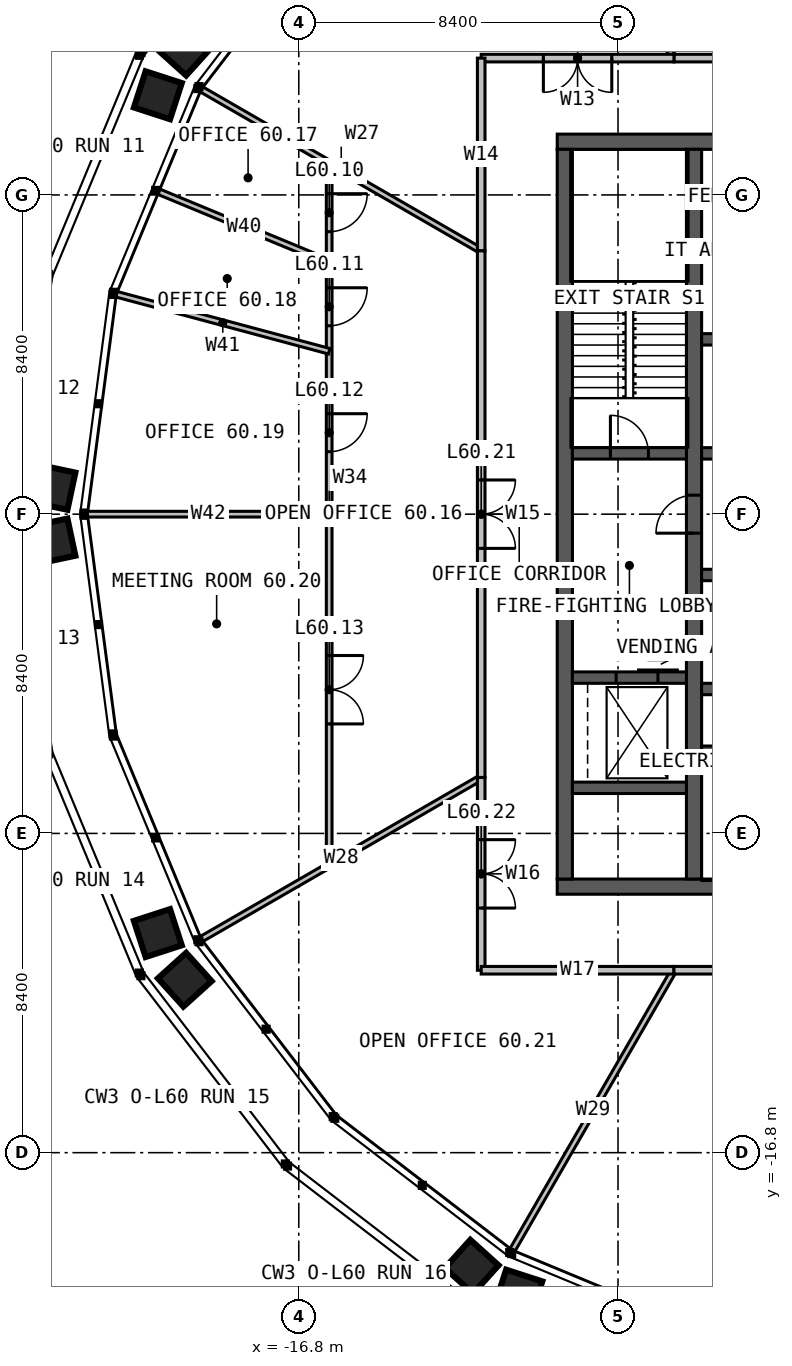
"""IFC4 building model, lengths in metres.
Left out: names, types, materials, properties, quantities, classifications, styles, units other than length and angle.
Written with IfcOpenShell. Run it as: python <this file> out.ifc"""

import sys

from ifc_helpers import new_model, si_unit, direction, frame, frame_2d, origin, place, context, subcontext, project, spatial, rectangle, extrude, element, fill, save


model = new_model("IFC4")
c1 = context("Model", 3, precision=1e-05, world=origin(), true_north=direction((0.0, 1.0)))
c2 = subcontext(c1, "Body", "Model", "MODEL_VIEW")
j1 = project(units=[si_unit("LENGTHUNIT", "METRE"), si_unit("PLANEANGLEUNIT", "RADIAN")], contexts=[c1])
p1 = place(None, origin())
s1 = spatial("IfcSite", under=j1, at=p1, CompositionType="ELEMENT")
p2 = place(p1, origin())
s2 = spatial("IfcBuilding", under=s1, at=p2, CompositionType="ELEMENT")
p3 = place(p2, frame((0.0, 0.0, 248.0)))
s3 = spatial("IfcBuildingStorey", under=s2, at=p3, CompositionType="ELEMENT", Elevation=248.0)
p4 = place(p3, frame((-10.0, 9.8, 0.0), z_axis=(0.0, 0.0, 1.0), x_axis=(1.0, 0.0, 0.0)))
e1 = element("IfcWall", 1, at=p4, inside=s3, PredefinedType="SOLIDWALL", context=c2, shape_type="SweptSolid", body=[
    extrude(rectangle(XDim=20.0, YDim=0.4, at=frame_2d((10.0, 0.0))), origin(), (0.0, 0.0, 1.0), 4.0),
])
p5 = place(p4, frame((9.4, 0.0, 0.0)))
e2 = element("IfcOpeningElement", 2, at=p5, cuts=e1, PredefinedType="OPENING", context=c2, shape_type="SweptSolid", body=[
    extrude(rectangle(XDim=1.2, YDim=2.2, at=frame_2d((0.6, 1.1))), frame((0.0, 0.21, 0.0), z_axis=(0.0, -1.0, 0.0), x_axis=(1.0, 0.0, 0.0)), (0.0, 0.0, 1.0), 0.42),
])
p6 = place(p3, frame((10.0, -9.8, 0.0), z_axis=(0.0, 0.0, 1.0), x_axis=(-1.0, 0.0, 0.0)))
e3 = element("IfcWall", 3, at=p6, inside=s3, PredefinedType="SOLIDWALL", context=c2, shape_type="SweptSolid", body=[
    extrude(rectangle(XDim=20.0, YDim=0.4, at=frame_2d((10.0, 0.0))), origin(), (0.0, 0.0, 1.0), 4.0),
])
p7 = place(p6, frame((6.875, 0.0, 0.0)))
e4 = element("IfcOpeningElement", 4, at=p7, cuts=e3, PredefinedType="OPENING", context=c2, shape_type="SweptSolid", body=[
    extrude(rectangle(XDim=1.2, YDim=2.2, at=frame_2d((0.6, 1.1))), frame((0.0, 0.21, 0.0), z_axis=(0.0, -1.0, 0.0), x_axis=(1.0, 0.0, 0.0)), (0.0, 0.0, 1.0), 0.42),
])
p8 = place(p3, frame((-9.8, 9.6, 0.0), z_axis=(0.0, 0.0, 1.0), x_axis=(0.0, -1.0, 0.0)))
e5 = element("IfcWall", 5, at=p8, inside=s3, PredefinedType="SOLIDWALL", context=c2, shape_type="SweptSolid", body=[
    extrude(rectangle(XDim=19.2, YDim=0.4, at=frame_2d((9.6, 0.0))), origin(), (0.0, 0.0, 1.0), 4.0),
])
p9 = place(p3, frame((-6.4, -9.6, 0.0), z_axis=(0.0, 0.0, 1.0), x_axis=(0.0, 1.0, 0.0)))
e6 = element("IfcWall", 6, at=p9, inside=s3, PredefinedType="SOLIDWALL", context=c2, shape_type="SweptSolid", body=[
    extrude(rectangle(XDim=19.2, YDim=0.4, at=frame_2d((9.6, 0.0))), origin(), (0.0, 0.0, 1.0), 4.0),
])
p10 = place(p9, frame((9.1, 0.0, 0.0)))
e7 = element("IfcOpeningElement", 7, at=p10, cuts=e6, PredefinedType="OPENING", context=c2, shape_type="SweptSolid", body=[
    extrude(rectangle(XDim=1.0, YDim=2.2, at=frame_2d((0.5, 1.1))), frame((0.0, 0.21, 0.0), z_axis=(0.0, -1.0, 0.0), x_axis=(1.0, 0.0, 0.0)), (0.0, 0.0, 1.0), 0.42),
])
p11 = place(p3, frame((-6.2, 1.6, 0.0), z_axis=(0.0, 0.0, 1.0), x_axis=(1.0, 0.0, 0.0)))
e8 = element("IfcWall", 8, at=p11, inside=s3, PredefinedType="SOLIDWALL", context=c2, shape_type="SweptSolid", body=[
    extrude(rectangle(XDim=4.85, YDim=0.3, at=frame_2d((2.425, 0.0))), origin(), (0.0, 0.0, 1.0), 4.0),
])
p12 = place(p11, frame((0.625, 0.0, 0.0)))
e9 = element("IfcOpeningElement", 9, at=p12, cuts=e8, PredefinedType="OPENING", context=c2, shape_type="SweptSolid", body=[
    extrude(rectangle(XDim=1.1, YDim=2.2, at=frame_2d((0.55, 1.1))), frame((0.0, 0.16, 0.0), z_axis=(0.0, -1.0, 0.0), x_axis=(1.0, 0.0, 0.0)), (0.0, 0.0, 1.0), 0.32),
])
p13 = place(p11, frame((3.15, 0.0, 0.0)))
e10 = element("IfcOpeningElement", 10, at=p13, cuts=e8, PredefinedType="OPENING", context=c2, shape_type="SweptSolid", body=[
    extrude(rectangle(XDim=1.1, YDim=2.2, at=frame_2d((0.55, 1.1))), frame((0.0, 0.16, 0.0), z_axis=(0.0, -1.0, 0.0), x_axis=(1.0, 0.0, 0.0)), (0.0, 0.0, 1.0), 0.32),
])
p14 = place(p3, frame((-6.2, 4.6, 0.0), z_axis=(0.0, 0.0, 1.0), x_axis=(1.0, 0.0, 0.0)))
e11 = element("IfcWall", 11, at=p14, inside=s3, PredefinedType="SOLIDWALL", context=c2, shape_type="SweptSolid", body=[
    extrude(rectangle(XDim=4.85, YDim=0.3, at=frame_2d((2.425, 0.0))), origin(), (0.0, 0.0, 1.0), 4.0),
])
p15 = place(p3, frame((-6.2, -1.6, 0.0), z_axis=(0.0, 0.0, 1.0), x_axis=(1.0, 0.0, 0.0)))
e12 = element("IfcWall", 12, at=p15, inside=s3, PredefinedType="SOLIDWALL", context=c2, shape_type="SweptSolid", body=[
    extrude(rectangle(XDim=7.4, YDim=0.3, at=frame_2d((3.7, 0.0))), origin(), (0.0, 0.0, 1.0), 4.0),
])
p16 = place(p15, frame((0.675, 0.0, 0.0)))
e13 = element("IfcOpeningElement", 13, at=p16, cuts=e12, PredefinedType="OPENING", context=c2, shape_type="SweptSolid", body=[
    extrude(rectangle(XDim=1.0, YDim=2.2, at=frame_2d((0.5, 1.1))), frame((0.0, 0.16, 0.0), z_axis=(0.0, -1.0, 0.0), x_axis=(1.0, 0.0, 0.0)), (0.0, 0.0, 1.0), 0.32),
])
p17 = place(p15, frame((2.225, 0.0, 0.0)))
e14 = element("IfcOpeningElement", 14, at=p17, cuts=e12, PredefinedType="OPENING", context=c2, shape_type="SweptSolid", body=[
    extrude(rectangle(XDim=1.0, YDim=2.2, at=frame_2d((0.5, 1.1))), frame((0.0, 0.16, 0.0), z_axis=(0.0, -1.0, 0.0), x_axis=(1.0, 0.0, 0.0)), (0.0, 0.0, 1.0), 0.32),
])
p18 = place(p15, frame((3.695, 0.0, 0.0)))
e15 = element("IfcOpeningElement", 15, at=p18, cuts=e12, PredefinedType="OPENING", context=c2, shape_type="SweptSolid", body=[
    extrude(rectangle(XDim=1.0, YDim=2.2, at=frame_2d((0.5, 1.1))), frame((0.0, 0.16, 0.0), z_axis=(0.0, -1.0, 0.0), x_axis=(1.0, 0.0, 0.0)), (0.0, 0.0, 1.0), 0.32),
])
p19 = place(p3, frame((-6.2, -4.6, 0.0), z_axis=(0.0, 0.0, 1.0), x_axis=(1.0, 0.0, 0.0)))
e16 = element("IfcWall", 16, at=p19, inside=s3, PredefinedType="SOLIDWALL", context=c2, shape_type="SweptSolid", body=[
    extrude(rectangle(XDim=7.4, YDim=0.3, at=frame_2d((3.7, 0.0))), origin(), (0.0, 0.0, 1.0), 4.0),
])
p20 = place(p3, frame((-6.2, -6.2, 0.0), z_axis=(0.0, 0.0, 1.0), x_axis=(1.0, 0.0, 0.0)))
e17 = element("IfcWall", 17, at=p20, inside=s3, PredefinedType="SOLIDWALL", context=c2, shape_type="SweptSolid", body=[
    extrude(rectangle(XDim=7.4, YDim=0.2, at=frame_2d((3.7, 0.0))), origin(), (0.0, 0.0, 1.0), 4.0),
])
p21 = place(p3, frame((-9.6, 1.6, 0.0), z_axis=(0.0, 0.0, 1.0), x_axis=(1.0, 0.0, 0.0)))
e18 = element("IfcWall", 18, at=p21, inside=s3, PredefinedType="SOLIDWALL", context=c2, shape_type="SweptSolid", body=[
    extrude(rectangle(XDim=3.0, YDim=0.3, at=frame_2d((1.5, 0.0))), origin(), (0.0, 0.0, 1.0), 4.0),
])
p22 = place(p21, frame((1.0, 0.0, 0.0)))
e19 = element("IfcOpeningElement", 19, at=p22, cuts=e18, PredefinedType="OPENING", context=c2, shape_type="SweptSolid", body=[
    extrude(rectangle(XDim=1.0, YDim=2.2, at=frame_2d((0.5, 1.1))), frame((0.0, 0.16, 0.0), z_axis=(0.0, -1.0, 0.0), x_axis=(1.0, 0.0, 0.0)), (0.0, 0.0, 1.0), 0.32),
])
p23 = place(p3, frame((-9.6, -4.3, 0.0), z_axis=(0.0, 0.0, 1.0), x_axis=(1.0, 0.0, 0.0)))
e20 = element("IfcWall", 20, at=p23, inside=s3, PredefinedType="SOLIDWALL", context=c2, shape_type="SweptSolid", body=[
    extrude(rectangle(XDim=3.0, YDim=0.3, at=frame_2d((1.5, 0.0))), origin(), (0.0, 0.0, 1.0), 4.0),
])
p24 = place(p23, frame((1.15, 0.0, 0.0)))
e21 = element("IfcOpeningElement", 21, at=p24, cuts=e20, PredefinedType="OPENING", context=c2, shape_type="SweptSolid", body=[
    extrude(rectangle(XDim=1.1, YDim=2.2, at=frame_2d((0.55, 1.1))), frame((0.0, 0.16, 0.0), z_axis=(0.0, -1.0, 0.0), x_axis=(1.0, 0.0, 0.0)), (0.0, 0.0, 1.0), 0.32),
])
p25 = place(p3, frame((-9.6, -7.2, 0.0), z_axis=(0.0, 0.0, 1.0), x_axis=(1.0, 0.0, 0.0)))
e22 = element("IfcWall", 22, at=p25, inside=s3, PredefinedType="SOLIDWALL", context=c2, shape_type="SweptSolid", body=[
    extrude(rectangle(XDim=3.0, YDim=0.3, at=frame_2d((1.5, 0.0))), origin(), (0.0, 0.0, 1.0), 4.0),
])
p26 = place(p3, frame((-6.2, 7.0, 0.0), z_axis=(0.0, 0.0, 1.0), x_axis=(1.0, 0.0, 0.0)))
e23 = element("IfcWall", 23, at=p26, inside=s3, PredefinedType="PARTITIONING", context=c2, shape_type="SweptSolid", body=[
    extrude(rectangle(XDim=3.225, YDim=0.15, at=frame_2d((1.612, 0.0))), origin(), (0.0, 0.0, 1.0), 3.75),
])
for number, where, z_axis, x_axis in (
    (24, (-6.928, 12.0, 0.0), (0.0, 0.0, 1.0), (-0.5, 0.866, 0.0)),
    (25, (-12.0, 6.928, 0.0), (0.0, 0.0, 1.0), (-0.866, 0.5, 0.0)),
    (26, (-12.0, -6.928, 0.0), (0.0, 0.0, 1.0), (-0.866, -0.5, 0.0)),
    (27, (-6.928, -12.0, 0.0), (0.0, 0.0, 1.0), (-0.5, -0.866, 0.0)),
):
    element("IfcWall", number, at=place(p3, frame(where, z_axis=z_axis, x_axis=x_axis)), inside=s3, PredefinedType="PARTITIONING", context=c2, shape_type="SweptSolid", body=[
        extrude(rectangle(XDim=8.505, YDim=0.15, at=frame_2d((4.252, 0.0))), origin(), (0.0, 0.0, 1.0), 2.79),
    ])
p27 = place(p3, frame((6.928, 12.0, 0.0), z_axis=(0.0, 0.0, 1.0), x_axis=(-1.0, 0.0, 0.0)))
e28 = element("IfcWall", 28, at=p27, inside=s3, PredefinedType="PARTITIONING", context=c2, shape_type="SweptSolid", body=[
    extrude(rectangle(XDim=13.856, YDim=0.2, at=frame_2d((6.928, 0.0))), origin(), (0.0, 0.0, 1.0), 3.8),
])
p28 = place(p27, frame((6.028, 0.0, 0.0)))
e29 = element("IfcOpeningElement", 29, at=p28, cuts=e28, PredefinedType="OPENING", context=c2, shape_type="SweptSolid", body=[
    extrude(rectangle(XDim=1.8, YDim=2.2, at=frame_2d((0.9, 1.1))), frame((0.0, 0.11, 0.0), z_axis=(0.0, -1.0, 0.0), x_axis=(1.0, 0.0, 0.0)), (0.0, 0.0, 1.0), 0.22),
])
p29 = place(p3, frame((-6.928, 12.0, 0.0), z_axis=(0.0, 0.0, 1.0), x_axis=(-1.0, 0.0, 0.0)))
e30 = element("IfcWall", 30, at=p29, inside=s3, PredefinedType="PARTITIONING", context=c2, shape_type="SweptSolid", body=[
    extrude(rectangle(XDim=5.072, YDim=0.2, at=frame_2d((2.536, 0.0))), origin(), (0.0, 0.0, 1.0), 3.8),
])
p30 = place(p29, frame((1.636, 0.0, 0.0)))
e31 = element("IfcOpeningElement", 31, at=p30, cuts=e30, PredefinedType="OPENING", context=c2, shape_type="SweptSolid", body=[
    extrude(rectangle(XDim=1.8, YDim=2.2, at=frame_2d((0.9, 1.1))), frame((0.0, 0.11, 0.0), z_axis=(0.0, -1.0, 0.0), x_axis=(1.0, 0.0, 0.0)), (0.0, 0.0, 1.0), 0.22),
])
p31 = place(p3, frame((-12.0, 12.0, 0.0), z_axis=(0.0, 0.0, 1.0), x_axis=(0.0, -1.0, 0.0)))
e32 = element("IfcWall", 32, at=p31, inside=s3, PredefinedType="PARTITIONING", context=c2, shape_type="SweptSolid", body=[
    extrude(rectangle(XDim=5.072, YDim=0.2, at=frame_2d((2.536, 0.0))), origin(), (0.0, 0.0, 1.0), 3.8),
])
p32 = place(p3, frame((-16.0, 9.238, 0.0), z_axis=(0.0, 0.0, 1.0), x_axis=(0.0, -1.0, 0.0)))
e33 = element("IfcWall", 33, at=p32, inside=s3, PredefinedType="PARTITIONING", context=c2, shape_type="SweptSolid", body=[
    extrude(rectangle(XDim=18.475, YDim=0.15, at=frame_2d((9.238, 0.0))), origin(), (0.0, 0.0, 1.0), 2.79),
])
p33 = place(p32, frame((0.805, 0.0, 0.0)))
e34 = element("IfcOpeningElement", 34, at=p33, cuts=e33, PredefinedType="OPENING", context=c2, shape_type="SweptSolid", body=[
    extrude(rectangle(XDim=1.0, YDim=2.2, at=frame_2d((0.5, 1.1))), frame((0.0, 0.085, 0.0), z_axis=(0.0, -1.0, 0.0), x_axis=(1.0, 0.0, 0.0)), (0.0, 0.0, 1.0), 0.17),
])
p34 = place(p32, frame((3.28, 0.0, 0.0)))
e35 = element("IfcOpeningElement", 35, at=p34, cuts=e33, PredefinedType="OPENING", context=c2, shape_type="SweptSolid", body=[
    extrude(rectangle(XDim=1.0, YDim=2.2, at=frame_2d((0.5, 1.1))), frame((0.0, 0.085, 0.0), z_axis=(0.0, -1.0, 0.0), x_axis=(1.0, 0.0, 0.0)), (0.0, 0.0, 1.0), 0.17),
])
p35 = place(p32, frame((6.594, 0.0, 0.0)))
e36 = element("IfcOpeningElement", 36, at=p35, cuts=e33, PredefinedType="OPENING", context=c2, shape_type="SweptSolid", body=[
    extrude(rectangle(XDim=1.0, YDim=2.2, at=frame_2d((0.5, 1.1))), frame((0.0, 0.085, 0.0), z_axis=(0.0, -1.0, 0.0), x_axis=(1.0, 0.0, 0.0)), (0.0, 0.0, 1.0), 0.17),
])
p36 = place(p32, frame((12.956, 0.0, 0.0)))
e37 = element("IfcOpeningElement", 37, at=p36, cuts=e33, PredefinedType="OPENING", context=c2, shape_type="SweptSolid", body=[
    extrude(rectangle(XDim=1.8, YDim=2.2, at=frame_2d((0.9, 1.1))), frame((0.0, 0.085, 0.0), z_axis=(0.0, -1.0, 0.0), x_axis=(1.0, 0.0, 0.0)), (0.0, 0.0, 1.0), 0.17),
])
p37 = place(p3, frame((-16.0, 6.627, 0.0), z_axis=(0.0, 0.0, 1.0), x_axis=(-0.923878838758, 0.38268510723, 0.0)))
e38 = element("IfcWall", 38, at=p37, inside=s3, PredefinedType="PARTITIONING", context=c2, shape_type="SweptSolid", body=[
    extrude(rectangle(XDim=4.852, YDim=0.15, at=frame_2d((2.426, 0.0))), origin(), (0.0, 0.0, 1.0), 2.79),
])
p38 = place(p3, frame((-16.0, 4.287, 0.0), z_axis=(0.0, 0.0, 1.0), x_axis=(-0.96591966376, 0.258842042881, 0.0)))
e39 = element("IfcWall", 39, at=p38, inside=s3, PredefinedType="PARTITIONING", context=c2, shape_type="SweptSolid", body=[
    extrude(rectangle(XDim=5.797, YDim=0.15, at=frame_2d((2.898, 0.0))), origin(), (0.0, 0.0, 1.0), 2.79),
])
p39 = place(p3, frame((-16.0, 0.0, 0.0), z_axis=(0.0, 0.0, 1.0), x_axis=(-1.0, 0.0, 0.0)))
e40 = element("IfcWall", 40, at=p39, inside=s3, PredefinedType="PARTITIONING", context=c2, shape_type="SweptSolid", body=[
    extrude(rectangle(XDim=6.361, YDim=0.15, at=frame_2d((3.181, 0.0))), origin(), (0.0, 0.0, 1.0), 2.79),
])
p40 = place(p3, frame((-12.0, 6.928, 0.0), z_axis=(0.0, 0.0, 1.0), x_axis=(0.0, -1.0, 0.0)))
e41 = element("IfcWall", 41, at=p40, inside=s3, PredefinedType="PARTITIONING", context=c2, shape_type="SweptSolid", body=[
    extrude(rectangle(XDim=13.856, YDim=0.2, at=frame_2d((6.928, 0.0))), origin(), (0.0, 0.0, 1.0), 3.8),
])
p41 = place(p40, frame((6.028, 0.0, 0.0)))
e42 = element("IfcOpeningElement", 42, at=p41, cuts=e41, PredefinedType="OPENING", context=c2, shape_type="SweptSolid", body=[
    extrude(rectangle(XDim=1.8, YDim=2.2, at=frame_2d((0.9, 1.1))), frame((0.0, 0.11, 0.0), z_axis=(0.0, -1.0, 0.0), x_axis=(1.0, 0.0, 0.0)), (0.0, 0.0, 1.0), 0.22),
])
p42 = place(p3, frame((-12.0, -6.928, 0.0), z_axis=(0.0, 0.0, 1.0), x_axis=(0.0, -1.0, 0.0)))
e43 = element("IfcWall", 43, at=p42, inside=s3, PredefinedType="PARTITIONING", context=c2, shape_type="SweptSolid", body=[
    extrude(rectangle(XDim=5.072, YDim=0.2, at=frame_2d((2.536, 0.0))), origin(), (0.0, 0.0, 1.0), 3.8),
])
p43 = place(p42, frame((1.636, 0.0, 0.0)))
e44 = element("IfcOpeningElement", 44, at=p43, cuts=e43, PredefinedType="OPENING", context=c2, shape_type="SweptSolid", body=[
    extrude(rectangle(XDim=1.8, YDim=2.2, at=frame_2d((0.9, 1.1))), frame((0.0, 0.11, 0.0), z_axis=(0.0, -1.0, 0.0), x_axis=(1.0, 0.0, 0.0)), (0.0, 0.0, 1.0), 0.22),
])
p44 = place(p3, frame((-12.0, -12.0, 0.0), z_axis=(0.0, 0.0, 1.0), x_axis=(1.0, 0.0, 0.0)))
e45 = element("IfcWall", 45, at=p44, inside=s3, PredefinedType="PARTITIONING", context=c2, shape_type="SweptSolid", body=[
    extrude(rectangle(XDim=5.072, YDim=0.2, at=frame_2d((2.536, 0.0))), origin(), (0.0, 0.0, 1.0), 3.8),
])
p45 = place(p3, frame((-6.928, -12.0, 0.0), z_axis=(0.0, 0.0, 1.0), x_axis=(1.0, 0.0, 0.0)))
e46 = element("IfcWall", 46, at=p45, inside=s3, PredefinedType="PARTITIONING", context=c2, shape_type="SweptSolid", body=[
    extrude(rectangle(XDim=13.856, YDim=0.2, at=frame_2d((6.928, 0.0))), origin(), (0.0, 0.0, 1.0), 3.8),
])
p46 = place(p45, frame((6.028, 0.0, 0.0)))
e47 = element("IfcOpeningElement", 47, at=p46, cuts=e46, PredefinedType="OPENING", context=c2, shape_type="SweptSolid", body=[
    extrude(rectangle(XDim=1.8, YDim=2.2, at=frame_2d((0.9, 1.1))), frame((0.0, 0.11, 0.0), z_axis=(0.0, -1.0, 0.0), x_axis=(1.0, 0.0, 0.0)), (0.0, 0.0, 1.0), 0.22),
])
p47 = place(p10, origin())
e48 = element("IfcDoor", 48, at=p47, inside=s3, OperationType="SINGLE_SWING_LEFT", PredefinedType="DOOR", context=c2, shape_type="SweptSolid", body=[
    extrude(rectangle(XDim=1.0, YDim=2.2, at=frame_2d((0.5, 1.1))), frame((0.0, 0.025, 0.0), z_axis=(0.0, -1.0, 0.0), x_axis=(1.0, 0.0, 0.0)), (0.0, 0.0, 1.0), 0.05),
])
fill(e7, e48)
p48 = place(p22, origin())
e49 = element("IfcDoor", 49, at=p48, inside=s3, OperationType="SINGLE_SWING_LEFT", PredefinedType="DOOR", context=c2, shape_type="SweptSolid", body=[
    extrude(rectangle(XDim=1.0, YDim=2.2, at=frame_2d((0.5, 1.1))), frame((0.0, 0.025, 0.0), z_axis=(0.0, -1.0, 0.0), x_axis=(1.0, 0.0, 0.0)), (0.0, 0.0, 1.0), 0.05),
])
fill(e19, e49)
p49 = place(p24, origin())
e50 = element("IfcDoor", 50, at=p49, inside=s3, OperationType="SLIDING_TO_LEFT", PredefinedType="DOOR", context=c2, shape_type="SweptSolid", body=[
    extrude(rectangle(XDim=1.1, YDim=2.2, at=frame_2d((0.55, 1.1))), frame((0.0, 0.025, 0.0), z_axis=(0.0, -1.0, 0.0), x_axis=(1.0, 0.0, 0.0)), (0.0, 0.0, 1.0), 0.05),
])
fill(e21, e50)
p50 = place(p30, origin())
e51 = element("IfcDoor", 51, at=p50, inside=s3, OperationType="DOUBLE_DOOR_SINGLE_SWING", PredefinedType="DOOR", context=c2, shape_type="SweptSolid", body=[
    extrude(rectangle(XDim=1.8, YDim=2.2, at=frame_2d((0.9, 1.1))), frame((0.0, 0.025, 0.0), z_axis=(0.0, -1.0, 0.0), x_axis=(1.0, 0.0, 0.0)), (0.0, 0.0, 1.0), 0.05),
])
fill(e31, e51)
p51 = place(p33, origin())
e52 = element("IfcDoor", 52, at=p51, inside=s3, OperationType="SINGLE_SWING_LEFT", PredefinedType="DOOR", context=c2, shape_type="SweptSolid", body=[
    extrude(rectangle(XDim=1.0, YDim=2.2, at=frame_2d((0.5, 1.1))), frame((0.0, 0.025, 0.0), z_axis=(0.0, -1.0, 0.0), x_axis=(1.0, 0.0, 0.0)), (0.0, 0.0, 1.0), 0.05),
])
fill(e34, e52)
p52 = place(p34, origin())
e53 = element("IfcDoor", 53, at=p52, inside=s3, OperationType="SINGLE_SWING_LEFT", PredefinedType="DOOR", context=c2, shape_type="SweptSolid", body=[
    extrude(rectangle(XDim=1.0, YDim=2.2, at=frame_2d((0.5, 1.1))), frame((0.0, 0.025, 0.0), z_axis=(0.0, -1.0, 0.0), x_axis=(1.0, 0.0, 0.0)), (0.0, 0.0, 1.0), 0.05),
])
fill(e35, e53)
p53 = place(p35, origin())
e54 = element("IfcDoor", 54, at=p53, inside=s3, OperationType="SINGLE_SWING_LEFT", PredefinedType="DOOR", context=c2, shape_type="SweptSolid", body=[
    extrude(rectangle(XDim=1.0, YDim=2.2, at=frame_2d((0.5, 1.1))), frame((0.0, 0.025, 0.0), z_axis=(0.0, -1.0, 0.0), x_axis=(1.0, 0.0, 0.0)), (0.0, 0.0, 1.0), 0.05),
])
fill(e36, e54)
p54 = place(p36, origin())
e55 = element("IfcDoor", 55, at=p54, inside=s3, OperationType="DOUBLE_DOOR_SINGLE_SWING", PredefinedType="DOOR", context=c2, shape_type="SweptSolid", body=[
    extrude(rectangle(XDim=1.8, YDim=2.2, at=frame_2d((0.9, 1.1))), frame((0.0, 0.025, 0.0), z_axis=(0.0, -1.0, 0.0), x_axis=(1.0, 0.0, 0.0)), (0.0, 0.0, 1.0), 0.05),
])
fill(e37, e55)
p55 = place(p41, origin())
e56 = element("IfcDoor", 56, at=p55, inside=s3, OperationType="DOUBLE_DOOR_SINGLE_SWING", PredefinedType="DOOR", context=c2, shape_type="SweptSolid", body=[
    extrude(rectangle(XDim=1.8, YDim=2.2, at=frame_2d((0.9, 1.1))), frame((0.0, 0.025, 0.0), z_axis=(0.0, -1.0, 0.0), x_axis=(1.0, 0.0, 0.0)), (0.0, 0.0, 1.0), 0.05),
])
fill(e42, e56)
p56 = place(p43, origin())
e57 = element("IfcDoor", 57, at=p56, inside=s3, OperationType="DOUBLE_DOOR_SINGLE_SWING", PredefinedType="DOOR", context=c2, shape_type="SweptSolid", body=[
    extrude(rectangle(XDim=1.8, YDim=2.2, at=frame_2d((0.9, 1.1))), frame((0.0, 0.025, 0.0), z_axis=(0.0, -1.0, 0.0), x_axis=(1.0, 0.0, 0.0)), (0.0, 0.0, 1.0), 0.05),
])
fill(e44, e57)
save(model, sys.argv[1])
